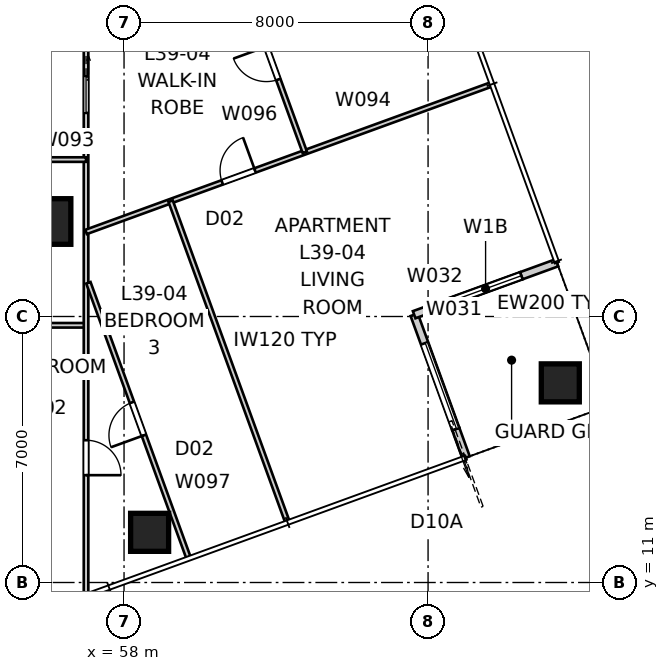
"""IFC4 building model, lengths in metres.
Left out: names, types, materials, properties, quantities, classifications, styles, units other than length and angle.
Written with IfcOpenShell. Run it as: python <this file> out.ifc"""

import sys

from ifc_helpers import new_model, si_unit, direction, frame, frame_2d, origin, origin_2d, place, context, subcontext, project, spatial, rectangle, extrude, element, fill, save


model = new_model("IFC4")
c1 = context("Model", 3, precision=1e-05, world=origin(), true_north=direction((0.0, 1.0)))
c2 = subcontext(c1, "Body", "Model", "MODEL_VIEW")
j1 = project(units=[si_unit("LENGTHUNIT", "METRE"), si_unit("PLANEANGLEUNIT", "RADIAN")], contexts=[c1])
p1 = place(None, origin())
s1 = spatial("IfcSite", under=j1, at=p1, CompositionType="ELEMENT")
p2 = place(p1, origin())
s2 = spatial("IfcBuilding", under=s1, at=p2, CompositionType="ELEMENT")
p3 = place(p2, frame((0.0, 0.0, 143.8)))
s3 = spatial("IfcBuildingStorey", under=s2, at=p3, CompositionType="ELEMENT", Elevation=143.8)
for number, where, z_axis, x_axis in (
    (1, (58.673, 12.32, -0.15), (0.0, 0.0, 1.0), (1.0, 0.0, 0.0)),
    (2, (69.479, 16.253, -0.15), (0.0, 0.0, 1.0), (1.0, 0.0, 0.0)),
):
    element("IfcColumn", number, at=place(p3, frame(where, z_axis=z_axis, x_axis=x_axis)), inside=s3, PredefinedType="COLUMN", context=c2, shape_type="SweptSolid", body=[
        extrude(rectangle(XDim=1.0, YDim=1.0, at=origin_2d()), origin(), (0.0, 0.0, 1.0), 3.55),
    ])
p4 = place(p3, frame((56.0, 20.5, 0.0), z_axis=(0.0, 0.0, 1.0), x_axis=(1.0, 0.0, 0.0)))
e3 = element("IfcColumn", 3, at=p4, inside=s3, PredefinedType="COLUMN", context=c2, shape_type="SweptSolid", body=[
    extrude(rectangle(XDim=1.2, YDim=1.2, at=origin_2d()), origin(), (0.0, 0.0, 1.0), 3.4),
])
p5 = place(p3, frame((67.002, 14.288, 0.0), z_axis=(0.0, 0.0, 1.0), x_axis=(-0.342110593602, 0.939659694648, 0.0)))
e4 = element("IfcWall", 4, at=p5, inside=s3, PredefinedType="SOLIDWALL", context=c2, shape_type="SweptSolid", body=[
    extrude(rectangle(XDim=0.8, YDim=0.2, at=frame_2d((0.4, 0.0))), origin(), (0.0, 0.0, 1.0), 3.25),
])
p6 = place(p3, frame((66.729, 15.04, 0.0), z_axis=(0.0, 0.0, 1.0), x_axis=(-0.342018703306, 0.939693144909, 0.0)))
e5 = element("IfcWall", 5, at=p6, inside=s3, PredefinedType="SOLIDWALL", context=c2, shape_type="SweptSolid", body=[
    extrude(rectangle(XDim=3.2, YDim=0.2, at=frame_2d((1.6, 0.0))), origin(), (0.0, 0.0, 1.0), 2.722),
])
p7 = place(p6, origin())
e6 = element("IfcOpeningElement", 6, at=p7, cuts=e5, PredefinedType="OPENING", context=c2, shape_type="SweptSolid", body=[
    extrude(rectangle(XDim=2.4, YDim=2.1, at=frame_2d((1.2, 1.05))), frame((0.0, 0.11, 0.0), z_axis=(0.0, -1.0, 0.0), x_axis=(1.0, 0.0, 0.0)), (0.0, 0.0, 1.0), 0.22),
])
p8 = place(p3, frame((65.634, 18.047, 0.0), z_axis=(0.0, 0.0, 1.0), x_axis=(0.939712609717, 0.341965219194, 0.0)))
e7 = element("IfcWall", 7, at=p8, inside=s3, PredefinedType="SOLIDWALL", context=c2, shape_type="SweptSolid", body=[
    extrude(rectangle(XDim=3.0, YDim=0.2, at=frame_2d((1.5, 0.0))), origin(), (0.0, 0.0, 1.0), 2.722),
])
p9 = place(p8, frame((1.0, 0.0, 0.45)))
e8 = element("IfcOpeningElement", 8, at=p9, cuts=e7, PredefinedType="OPENING", context=c2, shape_type="SweptSolid", body=[
    extrude(rectangle(XDim=2.0, YDim=1.8, at=frame_2d((1.0, 0.9))), frame((0.0, 0.11, 0.0), z_axis=(0.0, -1.0, 0.0), x_axis=(1.0, 0.0, 0.0)), (0.0, 0.0, 1.0), 0.22),
])
p10 = place(p3, frame((68.453, 19.073, 0.0), z_axis=(0.0, 0.0, 1.0), x_axis=(0.939686455819, 0.342037080957, 0.0)))
e9 = element("IfcWall", 9, at=p10, inside=s3, PredefinedType="SOLIDWALL", context=c2, shape_type="SweptSolid", body=[
    extrude(rectangle(XDim=1.0, YDim=0.2, at=frame_2d((0.5, 0.0))), origin(), (0.0, 0.0, 1.0), 3.25),
])
p11 = place(p3, frame((65.973, 28.812, 0.0), z_axis=(0.0, 0.0, 1.0), x_axis=(-0.939692090592, -0.342021600019, 0.0)))
e10 = element("IfcWall", 10, at=p11, inside=s3, PredefinedType="PARTITIONING", context=c2, shape_type="SweptSolid", body=[
    extrude(rectangle(XDim=12.949, YDim=0.25, at=frame_2d((6.474, 0.0))), origin(), (0.0, 0.0, 1.0), 3.25),
])
p12 = place(p3, frame((53.8, 17.769, 0.0), z_axis=(0.0, 0.0, 1.0), x_axis=(1.0, 0.0, 0.0)))
e11 = element("IfcWall", 11, at=p12, inside=s3, PredefinedType="PARTITIONING", context=c2, shape_type="SweptSolid", body=[
    extrude(rectangle(XDim=3.2, YDim=0.12, at=frame_2d((1.6, 0.0))), origin(), (0.0, 0.0, 1.0), 3.25),
])
p13 = place(p12, frame((1.12, 0.0, 0.0)))
e12 = element("IfcOpeningElement", 12, at=p13, cuts=e11, PredefinedType="OPENING", context=c2, shape_type="SweptSolid", body=[
    extrude(rectangle(XDim=0.96, YDim=2.1, at=frame_2d((0.48, 1.05))), frame((0.0, 0.07, 0.0), z_axis=(0.0, -1.0, 0.0), x_axis=(1.0, 0.0, 0.0)), (0.0, 0.0, 1.0), 0.14),
])
p14 = place(p3, frame((57.0, 48.8, 0.0), z_axis=(0.0, 0.0, 1.0), x_axis=(0.0, -1.0, 0.0)))
e13 = element("IfcWall", 13, at=p14, inside=s3, PredefinedType="PARTITIONING", context=c2, shape_type="SweptSolid", body=[
    extrude(rectangle(XDim=38.113, YDim=0.12, at=frame_2d((19.056, 0.0))), origin(), (0.0, 0.0, 1.0), 2.55),
])
p15 = place(p14, frame((4.198, 0.0, 0.0)))
e14 = element("IfcOpeningElement", 14, at=p15, cuts=e13, PredefinedType="OPENING", context=c2, shape_type="SweptSolid", body=[
    extrude(rectangle(XDim=0.92, YDim=2.34, at=frame_2d((0.46, 1.17))), frame((0.0, 0.07, 0.0), z_axis=(0.0, -1.0, 0.0), x_axis=(1.0, 0.0, 0.0)), (0.0, 0.0, 1.0), 0.14),
])
p16 = place(p14, frame((7.692, 0.0, 0.0)))
e15 = element("IfcOpeningElement", 15, at=p16, cuts=e13, PredefinedType="OPENING", context=c2, shape_type="SweptSolid", body=[
    extrude(rectangle(XDim=0.92, YDim=2.34, at=frame_2d((0.46, 1.17))), frame((0.0, 0.07, 0.0), z_axis=(0.0, -1.0, 0.0), x_axis=(1.0, 0.0, 0.0)), (0.0, 0.0, 1.0), 0.14),
])
p17 = place(p14, frame((20.162, 0.0, 0.0)))
e16 = element("IfcOpeningElement", 16, at=p17, cuts=e13, PredefinedType="OPENING", context=c2, shape_type="SweptSolid", body=[
    extrude(rectangle(XDim=0.92, YDim=2.34, at=frame_2d((0.46, 1.17))), frame((0.0, 0.07, 0.0), z_axis=(0.0, -1.0, 0.0), x_axis=(1.0, 0.0, 0.0)), (0.0, 0.0, 1.0), 0.14),
])
p18 = place(p14, frame((34.056, 0.0, 0.0)))
e17 = element("IfcOpeningElement", 17, at=p18, cuts=e13, PredefinedType="OPENING", context=c2, shape_type="SweptSolid", body=[
    extrude(rectangle(XDim=0.92, YDim=2.34, at=frame_2d((0.46, 1.17))), frame((0.0, 0.07, 0.0), z_axis=(0.0, -1.0, 0.0), x_axis=(1.0, 0.0, 0.0)), (0.0, 0.0, 1.0), 0.14),
])
p19 = place(p14, frame((24.482, 0.0, 0.0)))
e18 = element("IfcOpeningElement", 18, at=p19, cuts=e13, PredefinedType="OPENING", context=c2, shape_type="SweptSolid", body=[
    extrude(rectangle(XDim=0.96, YDim=2.1, at=frame_2d((0.48, 1.05))), frame((0.0, 0.07, 0.0), z_axis=(0.0, -1.0, 0.0), x_axis=(1.0, 0.0, 0.0)), (0.0, 0.0, 1.0), 0.14),
])
p20 = place(p3, frame((53.8, 22.129, 0.0), z_axis=(0.0, 0.0, 1.0), x_axis=(1.0, 0.0, 0.0)))
e19 = element("IfcWall", 19, at=p20, inside=s3, PredefinedType="PARTITIONING", context=c2, shape_type="SweptSolid", body=[
    extrude(rectangle(XDim=3.2, YDim=0.12, at=frame_2d((1.6, 0.0))), origin(), (0.0, 0.0, 1.0), 3.25),
])
p21 = place(p20, frame((0.52, 0.0, 0.0)))
e20 = element("IfcOpeningElement", 20, at=p21, cuts=e19, PredefinedType="OPENING", context=c2, shape_type="SweptSolid", body=[
    extrude(rectangle(XDim=0.96, YDim=2.1, at=frame_2d((0.48, 1.05))), frame((0.0, 0.07, 0.0), z_axis=(0.0, -1.0, 0.0), x_axis=(1.0, 0.0, 0.0)), (0.0, 0.0, 1.0), 0.14),
])
p22 = place(p3, frame((57.0, 20.225, 0.0), z_axis=(0.0, 0.0, 1.0), x_axis=(0.939693965364, 0.342016449105, 0.0)))
e21 = element("IfcWall", 21, at=p22, inside=s3, PredefinedType="PARTITIONING", context=c2, shape_type="SweptSolid", body=[
    extrude(rectangle(XDim=11.328, YDim=0.12, at=frame_2d((5.664, 0.0))), origin(), (0.0, 0.0, 1.0), 3.25),
])
p23 = place(p22, frame((3.812, 0.0, 0.0)))
e22 = element("IfcOpeningElement", 22, at=p23, cuts=e21, PredefinedType="OPENING", context=c2, shape_type="SweptSolid", body=[
    extrude(rectangle(XDim=0.92, YDim=2.34, at=frame_2d((0.46, 1.17))), frame((0.0, 0.07, 0.0), z_axis=(0.0, -1.0, 0.0), x_axis=(1.0, 0.0, 0.0)), (0.0, 0.0, 1.0), 0.14),
])
p24 = place(p3, frame((62.29, 12.615, 0.0), z_axis=(0.0, 0.0, 1.0), x_axis=(-0.342038393654, 0.939685978009, 0.0)))
e23 = element("IfcWall", 23, at=p24, inside=s3, PredefinedType="PARTITIONING", context=c2, shape_type="SweptSolid", body=[
    extrude(rectangle(XDim=8.96, YDim=0.12, at=frame_2d((4.48, 0.0))), origin(), (0.0, 0.0, 1.0), 3.25),
])
p25 = place(p3, frame((62.757, 22.32, 0.0), z_axis=(0.0, 0.0, 1.0), x_axis=(-0.341993964619, 0.939702148643, 0.0)))
e24 = element("IfcWall", 24, at=p25, inside=s3, PredefinedType="PARTITIONING", context=c2, shape_type="SweptSolid", body=[
    extrude(rectangle(XDim=5.0, YDim=0.12, at=frame_2d((2.5, 0.0))), origin(), (0.0, 0.0, 1.0), 3.25),
])
p26 = place(p25, frame((2.04, 0.0, 0.0)))
e25 = element("IfcOpeningElement", 25, at=p26, cuts=e24, PredefinedType="OPENING", context=c2, shape_type="SweptSolid", body=[
    extrude(rectangle(XDim=0.92, YDim=2.34, at=frame_2d((0.46, 1.17))), frame((0.0, 0.07, 0.0), z_axis=(0.0, -1.0, 0.0), x_axis=(1.0, 0.0, 0.0)), (0.0, 0.0, 1.0), 0.14),
])
p27 = place(p3, frame((59.689, 11.669, 0.0), z_axis=(0.0, 0.0, 1.0), x_axis=(-0.342003311293, 0.939698746974, 0.0)))
e26 = element("IfcWall", 26, at=p27, inside=s3, PredefinedType="PARTITIONING", context=c2, shape_type="SweptSolid", body=[
    extrude(rectangle(XDim=7.683, YDim=0.12, at=frame_2d((3.841, 0.0))), origin(), (0.0, 0.0, 1.0), 3.25),
])
p28 = place(p27, frame((3.411, 0.0, 0.0)))
e27 = element("IfcOpeningElement", 27, at=p28, cuts=e26, PredefinedType="OPENING", context=c2, shape_type="SweptSolid", body=[
    extrude(rectangle(XDim=0.92, YDim=2.34, at=frame_2d((0.46, 1.17))), frame((0.0, 0.07, 0.0), z_axis=(0.0, -1.0, 0.0), x_axis=(1.0, 0.0, 0.0)), (0.0, 0.0, 1.0), 0.14),
])
p29 = place(p7, origin())
e28 = element("IfcDoor", 28, at=p29, inside=s3, OperationType="SLIDING_TO_LEFT", PredefinedType="DOOR", context=c2, shape_type="SweptSolid", body=[
    extrude(rectangle(XDim=2.4, YDim=2.1, at=frame_2d((1.2, 1.05))), frame((0.0, 0.025, 0.0), z_axis=(0.0, -1.0, 0.0), x_axis=(1.0, 0.0, 0.0)), (0.0, 0.0, 1.0), 0.05),
])
fill(e6, e28)
p30 = place(p9, origin())
e29 = element("IfcWindow", 29, at=p30, inside=s3, PartitioningType="SINGLE_PANEL", PredefinedType="WINDOW", context=c2, shape_type="SweptSolid", body=[
    extrude(rectangle(XDim=2.0, YDim=1.8, at=frame_2d((1.0, 0.9))), frame((0.0, 0.03, 0.0), z_axis=(0.0, -1.0, 0.0), x_axis=(1.0, 0.0, 0.0)), (0.0, 0.0, 1.0), 0.06),
])
fill(e8, e29)
p31 = place(p18, origin())
e30 = element("IfcDoor", 30, at=p31, inside=s3, OperationType="SINGLE_SWING_RIGHT", PredefinedType="DOOR", context=c2, shape_type="SweptSolid", body=[
    extrude(rectangle(XDim=0.92, YDim=2.34, at=frame_2d((0.46, 1.17))), frame((0.0, 0.025, 0.0), z_axis=(0.0, -1.0, 0.0), x_axis=(1.0, 0.0, 0.0)), (0.0, 0.0, 1.0), 0.05),
])
fill(e17, e30)
p32 = place(p28, origin())
e31 = element("IfcDoor", 31, at=p32, inside=s3, OperationType="SINGLE_SWING_LEFT", PredefinedType="DOOR", context=c2, shape_type="SweptSolid", body=[
    extrude(rectangle(XDim=0.92, YDim=2.34, at=frame_2d((0.46, 1.17))), frame((0.0, 0.025, 0.0), z_axis=(0.0, -1.0, 0.0), x_axis=(1.0, 0.0, 0.0)), (0.0, 0.0, 1.0), 0.05),
])
fill(e27, e31)
p33 = place(p19, origin())
e32 = element("IfcDoor", 32, at=p33, inside=s3, OperationType="SLIDING_TO_LEFT", PredefinedType="DOOR", context=c2, shape_type="SweptSolid", body=[
    extrude(rectangle(XDim=0.96, YDim=2.1, at=frame_2d((0.48, 1.05))), frame((0.0, 0.025, 0.0), z_axis=(0.0, -1.0, 0.0), x_axis=(1.0, 0.0, 0.0)), (0.0, 0.0, 1.0), 0.05),
])
fill(e18, e32)
p34 = place(p26, origin())
e33 = element("IfcDoor", 33, at=p34, inside=s3, OperationType="SINGLE_SWING_RIGHT", PredefinedType="DOOR", context=c2, shape_type="SweptSolid", body=[
    extrude(rectangle(XDim=0.92, YDim=2.34, at=frame_2d((0.46, 1.17))), frame((0.0, 0.025, 0.0), z_axis=(0.0, -1.0, 0.0), x_axis=(1.0, 0.0, 0.0)), (0.0, 0.0, 1.0), 0.05),
])
fill(e25, e33)
p35 = place(p23, origin())
e34 = element("IfcDoor", 34, at=p35, inside=s3, OperationType="SINGLE_SWING_RIGHT", PredefinedType="DOOR", context=c2, shape_type="SweptSolid", body=[
    extrude(rectangle(XDim=0.92, YDim=2.34, at=frame_2d((0.46, 1.17))), frame((0.0, 0.025, 0.0), z_axis=(0.0, -1.0, 0.0), x_axis=(1.0, 0.0, 0.0)), (0.0, 0.0, 1.0), 0.05),
])
fill(e22, e34)
save(model, sys.argv[1])
